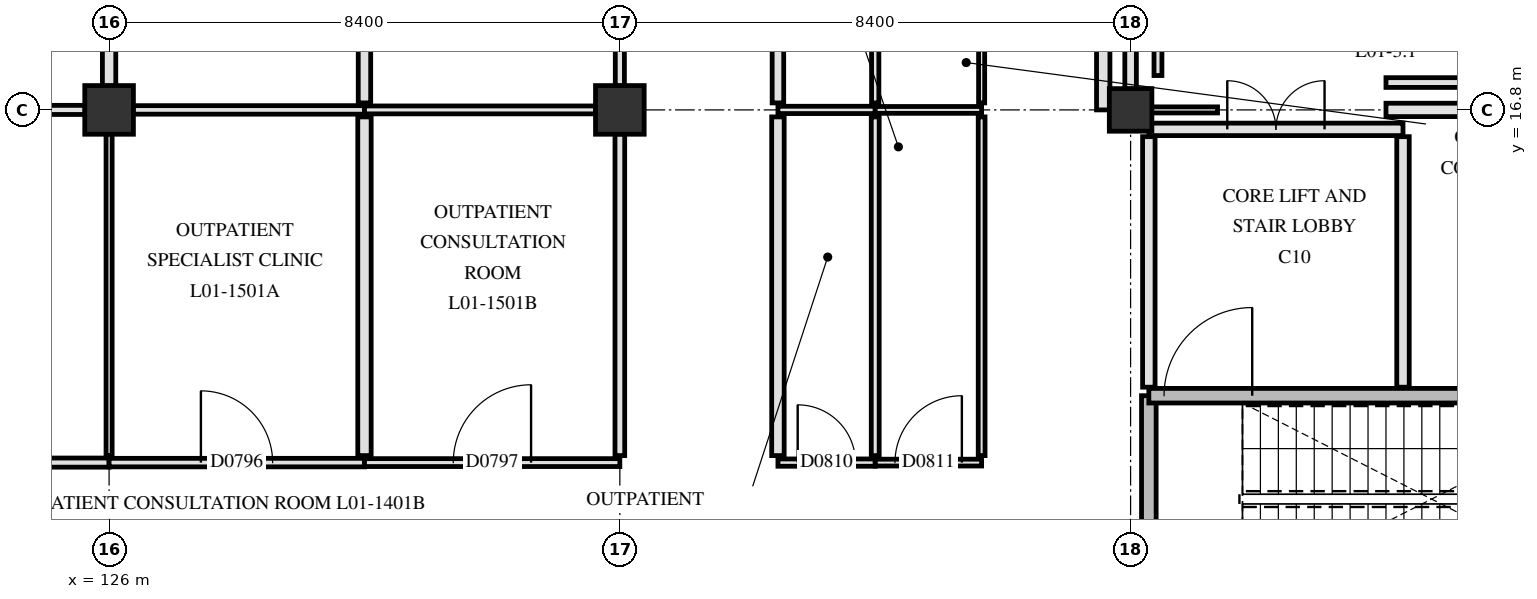
"""IFC4 building model, lengths in metres.
Left out: names, types, materials, properties, quantities, classifications, styles, units other than length and angle.
Written with IfcOpenShell. Run it as: python <this file> out.ifc"""

import sys

from ifc_helpers import new_model, si_unit, direction, frame, frame_2d, origin, origin_2d, place, context, subcontext, project, spatial, rectangle, extrude, element, fill, save


model = new_model("IFC4")
c1 = context("Model", 3, precision=1e-05, world=origin(), true_north=direction((0.0, 1.0)))
c2 = subcontext(c1, "Body", "Model", "MODEL_VIEW")
j1 = project(units=[si_unit("LENGTHUNIT", "METRE"), si_unit("PLANEANGLEUNIT", "RADIAN")], contexts=[c1])
p1 = place(None, origin())
s1 = spatial("IfcSite", under=j1, at=p1, CompositionType="ELEMENT")
p2 = place(p1, origin())
s2 = spatial("IfcBuilding", under=s1, at=p2, CompositionType="ELEMENT")
p3 = place(p2, frame((0.0, 0.0, 4.8)))
s3 = spatial("IfcBuildingStorey", under=s2, at=p3, CompositionType="ELEMENT", Elevation=4.8)
for number, where, z_axis, x_axis in (
    (1, (126.0, 16.8, 0.0), (0.0, 0.0, 1.0), (1.0, 0.0, 0.0)),
    (2, (134.4, 16.8, 0.0), (0.0, 0.0, 1.0), (1.0, 0.0, 0.0)),
):
    element("IfcColumn", number, at=place(p3, frame(where, z_axis=z_axis, x_axis=x_axis)), inside=s3, PredefinedType="COLUMN", context=c2, shape_type="SweptSolid", body=[
        extrude(rectangle(XDim=0.8, YDim=0.8, at=origin_2d()), origin(), (0.0, 0.0, 1.0), 4.5),
    ])
p4 = place(p3, frame((142.8, 16.8, 0.0), z_axis=(0.0, 0.0, 1.0), x_axis=(1.0, 0.0, 0.0)))
e3 = element("IfcColumn", 3, at=p4, inside=s3, PredefinedType="COLUMN", context=c2, shape_type="SweptSolid", body=[
    extrude(rectangle(XDim=0.7, YDim=0.7, at=origin_2d()), origin(), (0.0, 0.0, 1.0), 4.5),
])
p5 = place(p3, frame((143.1, 8.78, 0.0), z_axis=(0.0, 0.0, 1.0), x_axis=(0.0, 1.0, 0.0)))
e4 = element("IfcWall", 4, at=p5, inside=s3, PredefinedType="SHEAR", context=c2, shape_type="SweptSolid", body=[
    extrude(rectangle(XDim=3.32, YDim=0.24, at=frame_2d((1.66, 0.0))), origin(), (0.0, 0.0, 1.0), 4.15),
])
p6 = place(p3, frame((143.1, 12.1, 0.0), z_axis=(0.0, 0.0, 1.0), x_axis=(1.0, 0.0, 0.0)))
e5 = element("IfcWall", 5, at=p6, inside=s3, PredefinedType="SHEAR", context=c2, shape_type="SweptSolid", body=[
    extrude(rectangle(XDim=7.82, YDim=0.24, at=frame_2d((3.91, 0.0))), origin(), (0.0, 0.0, 1.0), 4.15),
])
p7 = place(p6, frame((0.25, 0.0, 0.0)))
e6 = element("IfcOpeningElement", 6, at=p7, cuts=e5, PredefinedType="OPENING", context=c2, shape_type="SweptSolid", body=[
    extrude(rectangle(XDim=1.45, YDim=2.2, at=frame_2d((0.725, 1.1))), frame((0.0, 0.13, 0.0), z_axis=(0.0, -1.0, 0.0), x_axis=(1.0, 0.0, 0.0)), (0.0, 0.0, 1.0), 0.26),
])
p8 = place(p3, frame((147.28, 12.24, 0.0), z_axis=(0.0, 0.0, 1.0), x_axis=(0.0, 1.0, 0.0)))
e7 = element("IfcWall", 7, at=p8, inside=s3, PredefinedType="PARTITIONING", context=c2, shape_type="SweptSolid", body=[
    extrude(rectangle(XDim=4.12, YDim=0.205, at=frame_2d((2.06, 0.0))), origin(), (0.0, 0.0, 1.0), 4.14),
])
p9 = place(p3, frame((143.1, 12.24, 0.0), z_axis=(0.0, 0.0, 1.0), x_axis=(0.0, 1.0, 0.0)))
e8 = element("IfcWall", 8, at=p9, inside=s3, PredefinedType="PARTITIONING", context=c2, shape_type="SweptSolid", body=[
    extrude(rectangle(XDim=4.12, YDim=0.205, at=frame_2d((2.06, 0.0))), origin(), (0.0, 0.0, 1.0), 3.59),
])
p10 = place(p3, frame((143.1, 16.48, 0.0), z_axis=(0.0, 0.0, 1.0), x_axis=(1.0, 0.0, 0.0)))
e9 = element("IfcWall", 9, at=p10, inside=s3, PredefinedType="PARTITIONING", context=c2, shape_type="SweptSolid", body=[
    extrude(rectangle(XDim=4.18, YDim=0.205, at=frame_2d((2.09, 0.0))), origin(), (0.0, 0.0, 1.0), 3.54),
])
p11 = place(p10, frame((1.29, 0.0, 0.0)))
e10 = element("IfcOpeningElement", 10, at=p11, cuts=e9, PredefinedType="OPENING", context=c2, shape_type="SweptSolid", body=[
    extrude(rectangle(XDim=1.6, YDim=2.25, at=frame_2d((0.8, 1.125))), frame((0.0, 0.113, 0.0), z_axis=(0.0, -1.0, 0.0), x_axis=(1.0, 0.0, 0.0)), (0.0, 0.0, 1.0), 0.225),
])
p12 = place(p3, frame((121.8, 11.0, 0.0), z_axis=(0.0, 0.0, 1.0), x_axis=(1.0, 0.0, 0.0)))
e11 = element("IfcWall", 11, at=p12, inside=s3, PredefinedType="PARTITIONING", context=c2, shape_type="SweptSolid", body=[
    extrude(rectangle(XDim=4.2, YDim=0.15, at=frame_2d((2.1, 0.0))), origin(), (0.0, 0.0, 1.0), 3.59),
])
p13 = place(p12, frame((1.5, 0.0, 0.0)))
e12 = element("IfcOpeningElement", 12, at=p13, cuts=e11, PredefinedType="OPENING", context=c2, shape_type="SweptSolid", body=[
    extrude(rectangle(XDim=1.2, YDim=2.15, at=frame_2d((0.6, 1.075))), frame((0.0, 0.085, 0.0), z_axis=(0.0, -1.0, 0.0), x_axis=(1.0, 0.0, 0.0)), (0.0, 0.0, 1.0), 0.17),
])
p14 = place(p3, frame((126.0, 11.0, 0.0), z_axis=(0.0, 0.0, 1.0), x_axis=(1.0, 0.0, 0.0)))
e13 = element("IfcWall", 13, at=p14, inside=s3, PredefinedType="PARTITIONING", context=c2, shape_type="SweptSolid", body=[
    extrude(rectangle(XDim=4.2, YDim=0.14, at=frame_2d((2.1, 0.0))), origin(), (0.0, 0.0, 1.0), 3.59),
])
p15 = place(p14, frame((1.51, 0.0, 0.0)))
e14 = element("IfcOpeningElement", 14, at=p15, cuts=e13, PredefinedType="OPENING", context=c2, shape_type="SweptSolid", body=[
    extrude(rectangle(XDim=1.18, YDim=2.18, at=frame_2d((0.59, 1.09))), frame((0.0, 0.08, 0.0), z_axis=(0.0, -1.0, 0.0), x_axis=(1.0, 0.0, 0.0)), (0.0, 0.0, 1.0), 0.16),
])
p16 = place(p3, frame((130.2, 11.0, 0.0), z_axis=(0.0, 0.0, 1.0), x_axis=(1.0, 0.0, 0.0)))
e15 = element("IfcWall", 15, at=p16, inside=s3, PredefinedType="PARTITIONING", context=c2, shape_type="SweptSolid", body=[
    extrude(rectangle(XDim=4.2, YDim=0.13, at=frame_2d((2.1, 0.0))), origin(), (0.0, 0.0, 1.0), 3.59),
])
p17 = place(p16, frame((1.46, 0.0, 0.0)))
e16 = element("IfcOpeningElement", 16, at=p17, cuts=e15, PredefinedType="OPENING", context=c2, shape_type="SweptSolid", body=[
    extrude(rectangle(XDim=1.28, YDim=2.18, at=frame_2d((0.64, 1.09))), frame((0.0, 0.075, 0.0), z_axis=(0.0, -1.0, 0.0), x_axis=(1.0, 0.0, 0.0)), (0.0, 0.0, 1.0), 0.15),
])
p18 = place(p3, frame((137.0, 11.0, 0.0), z_axis=(0.0, 0.0, 1.0), x_axis=(1.0, 0.0, 0.0)))
e17 = element("IfcWall", 17, at=p18, inside=s3, PredefinedType="PARTITIONING", context=c2, shape_type="SweptSolid", body=[
    extrude(rectangle(XDim=1.6, YDim=0.12, at=frame_2d((0.8, 0.0))), origin(), (0.0, 0.0, 1.0), 4.14),
])
p19 = place(p18, frame((0.325, 0.0, 0.0)))
e18 = element("IfcOpeningElement", 18, at=p19, cuts=e17, PredefinedType="OPENING", context=c2, shape_type="SweptSolid", body=[
    extrude(rectangle(XDim=0.95, YDim=2.1, at=frame_2d((0.475, 1.05))), frame((0.0, 0.07, 0.0), z_axis=(0.0, -1.0, 0.0), x_axis=(1.0, 0.0, 0.0)), (0.0, 0.0, 1.0), 0.14),
])
p20 = place(p3, frame((138.6, 11.0, 0.0), z_axis=(0.0, 0.0, 1.0), x_axis=(1.0, 0.0, 0.0)))
e19 = element("IfcWall", 19, at=p20, inside=s3, PredefinedType="PARTITIONING", context=c2, shape_type="SweptSolid", body=[
    extrude(rectangle(XDim=1.75, YDim=0.112, at=frame_2d((0.875, 0.0))), origin(), (0.0, 0.0, 1.0), 4.14),
])
p21 = place(p20, frame((0.325, 0.0, 0.0)))
e20 = element("IfcOpeningElement", 20, at=p21, cuts=e19, PredefinedType="OPENING", context=c2, shape_type="SweptSolid", body=[
    extrude(rectangle(XDim=1.1, YDim=2.15, at=frame_2d((0.55, 1.075))), frame((0.0, 0.066, 0.0), z_axis=(0.0, -1.0, 0.0), x_axis=(1.0, 0.0, 0.0)), (0.0, 0.0, 1.0), 0.132),
])
p22 = place(p3, frame((121.8, 16.8, 0.0), z_axis=(0.0, 0.0, 1.0), x_axis=(1.0, 0.0, 0.0)))
e21 = element("IfcWall", 21, at=p22, inside=s3, PredefinedType="PARTITIONING", context=c2, shape_type="SweptSolid", body=[
    extrude(rectangle(XDim=3.805, YDim=0.15, at=frame_2d((1.902, 0.0))), origin(), (0.0, 0.0, 1.0), 3.54),
])
p23 = place(p3, frame((126.395, 16.8, 0.0), z_axis=(0.0, 0.0, 1.0), x_axis=(1.0, 0.0, 0.0)))
e22 = element("IfcWall", 22, at=p23, inside=s3, PredefinedType="PARTITIONING", context=c2, shape_type="SweptSolid", body=[
    extrude(rectangle(XDim=3.805, YDim=0.14, at=frame_2d((1.902, 0.0))), origin(), (0.0, 0.0, 1.0), 3.54),
])
p24 = place(p3, frame((130.2, 16.8, 0.0), z_axis=(0.0, 0.0, 1.0), x_axis=(1.0, 0.0, 0.0)))
e23 = element("IfcWall", 23, at=p24, inside=s3, PredefinedType="PARTITIONING", context=c2, shape_type="SweptSolid", body=[
    extrude(rectangle(XDim=3.805, YDim=0.13, at=frame_2d((1.902, 0.0))), origin(), (0.0, 0.0, 1.0), 3.54),
])
p25 = place(p3, frame((137.0, 16.8, 0.0), z_axis=(0.0, 0.0, 1.0), x_axis=(1.0, 0.0, 0.0)))
e24 = element("IfcWall", 24, at=p25, inside=s3, PredefinedType="PARTITIONING", context=c2, shape_type="SweptSolid", body=[
    extrude(rectangle(XDim=1.6, YDim=0.12, at=frame_2d((0.8, 0.0))), origin(), (0.0, 0.0, 1.0), 3.54),
])
p26 = place(p3, frame((138.6, 16.8, 0.0), z_axis=(0.0, 0.0, 1.0), x_axis=(1.0, 0.0, 0.0)))
e25 = element("IfcWall", 25, at=p26, inside=s3, PredefinedType="PARTITIONING", context=c2, shape_type="SweptSolid", body=[
    extrude(rectangle(XDim=1.75, YDim=0.112, at=frame_2d((0.875, 0.0))), origin(), (0.0, 0.0, 1.0), 3.54),
])
p27 = place(p3, frame((143.145, 16.8, 0.0), z_axis=(0.0, 0.0, 1.0), x_axis=(1.0, 0.0, 0.0)))
e26 = element("IfcWall", 26, at=p27, inside=s3, PredefinedType="PARTITIONING", context=c2, shape_type="SweptSolid", body=[
    extrude(rectangle(XDim=1.085, YDim=0.1, at=frame_2d((0.542, 0.0))), origin(), (0.0, 0.0, 1.0), 3.54),
])
p28 = place(p3, frame((147.0, 16.8, 0.0), z_axis=(0.0, 0.0, 1.0), x_axis=(1.0, 0.0, 0.0)))
e27 = element("IfcWall", 27, at=p28, inside=s3, PredefinedType="PARTITIONING", context=c2, shape_type="SweptSolid", body=[
    extrude(rectangle(XDim=3.855, YDim=0.22, at=frame_2d((1.927, 0.0))), origin(), (0.0, 0.0, 1.0), 3.54),
])
p29 = place(p3, frame((147.0, 17.25, 0.0), z_axis=(0.0, 0.0, 1.0), x_axis=(1.0, 0.0, 0.0)))
e28 = element("IfcWall", 28, at=p29, inside=s3, PredefinedType="PARTITIONING", context=c2, shape_type="SweptSolid", body=[
    extrude(rectangle(XDim=3.75, YDim=0.16, at=frame_2d((1.875, 0.0))), origin(), (0.0, 0.0, 1.0), 4.14),
])
p30 = place(p3, frame((126.0, 11.115, 0.0), z_axis=(0.0, 0.0, 1.0), x_axis=(0.0, 1.0, 0.0)))
e29 = element("IfcWall", 29, at=p30, inside=s3, PredefinedType="PARTITIONING", context=c2, shape_type="SweptSolid", body=[
    extrude(rectangle(XDim=5.29, YDim=0.1, at=frame_2d((2.645, 0.0))), origin(), (0.0, 0.0, 1.0), 3.59),
])
p31 = place(p3, frame((126.0, 17.195, 0.0), z_axis=(0.0, 0.0, 1.0), x_axis=(0.0, 1.0, 0.0)))
e30 = element("IfcWall", 30, at=p31, inside=s3, PredefinedType="PARTITIONING", context=c2, shape_type="SweptSolid", body=[
    extrude(rectangle(XDim=5.29, YDim=0.22, at=frame_2d((2.645, 0.0))), origin(), (0.0, 0.0, 1.0), 3.59),
])
p32 = place(p3, frame((130.2, 11.115, 0.0), z_axis=(0.0, 0.0, 1.0), x_axis=(0.0, 1.0, 0.0)))
e31 = element("IfcWall", 31, at=p32, inside=s3, PredefinedType="PARTITIONING", context=c2, shape_type="SweptSolid", body=[
    extrude(rectangle(XDim=5.57, YDim=0.22, at=frame_2d((2.785, 0.0))), origin(), (0.0, 0.0, 1.0), 3.54),
])
p33 = place(p3, frame((130.2, 16.915, 0.0), z_axis=(0.0, 0.0, 1.0), x_axis=(0.0, 1.0, 0.0)))
e32 = element("IfcWall", 32, at=p33, inside=s3, PredefinedType="PARTITIONING", context=c2, shape_type="SweptSolid", body=[
    extrude(rectangle(XDim=5.57, YDim=0.205, at=frame_2d((2.785, 0.0))), origin(), (0.0, 0.0, 1.0), 3.54),
])
p34 = place(p3, frame((134.4, 11.115, 0.0), z_axis=(0.0, 0.0, 1.0), x_axis=(0.0, 1.0, 0.0)))
e33 = element("IfcWall", 33, at=p34, inside=s3, PredefinedType="PARTITIONING", context=c2, shape_type="SweptSolid", body=[
    extrude(rectangle(XDim=5.29, YDim=0.16, at=frame_2d((2.645, 0.0))), origin(), (0.0, 0.0, 1.0), 3.59),
])
p35 = place(p3, frame((134.4, 17.195, 0.0), z_axis=(0.0, 0.0, 1.0), x_axis=(0.0, 1.0, 0.0)))
e34 = element("IfcWall", 34, at=p35, inside=s3, PredefinedType="PARTITIONING", context=c2, shape_type="SweptSolid", body=[
    extrude(rectangle(XDim=5.29, YDim=0.15, at=frame_2d((2.645, 0.0))), origin(), (0.0, 0.0, 1.0), 3.59),
])
p36 = place(p3, frame((137.0, 11.115, 0.0), z_axis=(0.0, 0.0, 1.0), x_axis=(0.0, 1.0, 0.0)))
e35 = element("IfcWall", 35, at=p36, inside=s3, PredefinedType="PARTITIONING", context=c2, shape_type="SweptSolid", body=[
    extrude(rectangle(XDim=5.57, YDim=0.205, at=frame_2d((2.785, 0.0))), origin(), (0.0, 0.0, 1.0), 3.54),
])
p37 = place(p3, frame((137.0, 16.915, 0.0), z_axis=(0.0, 0.0, 1.0), x_axis=(0.0, 1.0, 0.0)))
e36 = element("IfcWall", 36, at=p37, inside=s3, PredefinedType="PARTITIONING", context=c2, shape_type="SweptSolid", body=[
    extrude(rectangle(XDim=5.57, YDim=0.19, at=frame_2d((2.785, 0.0))), origin(), (0.0, 0.0, 1.0), 3.54),
])
p38 = place(p3, frame((138.6, 11.115, 0.0), z_axis=(0.0, 0.0, 1.0), x_axis=(0.0, 1.0, 0.0)))
e37 = element("IfcWall", 37, at=p38, inside=s3, PredefinedType="PARTITIONING", context=c2, shape_type="SweptSolid", body=[
    extrude(rectangle(XDim=5.57, YDim=0.13, at=frame_2d((2.785, 0.0))), origin(), (0.0, 0.0, 1.0), 3.54),
])
p39 = place(p3, frame((138.6, 16.915, 0.0), z_axis=(0.0, 0.0, 1.0), x_axis=(0.0, 1.0, 0.0)))
e38 = element("IfcWall", 38, at=p39, inside=s3, PredefinedType="PARTITIONING", context=c2, shape_type="SweptSolid", body=[
    extrude(rectangle(XDim=5.57, YDim=0.12, at=frame_2d((2.785, 0.0))), origin(), (0.0, 0.0, 1.0), 3.54),
])
p40 = place(p3, frame((140.35, 11.115, 0.0), z_axis=(0.0, 0.0, 1.0), x_axis=(0.0, 1.0, 0.0)))
e39 = element("IfcWall", 39, at=p40, inside=s3, PredefinedType="PARTITIONING", context=c2, shape_type="SweptSolid", body=[
    extrude(rectangle(XDim=5.57, YDim=0.112, at=frame_2d((2.785, 0.0))), origin(), (0.0, 0.0, 1.0), 3.54),
])
p41 = place(p3, frame((140.35, 16.915, 0.0), z_axis=(0.0, 0.0, 1.0), x_axis=(0.0, 1.0, 0.0)))
e40 = element("IfcWall", 40, at=p41, inside=s3, PredefinedType="PARTITIONING", context=c2, shape_type="SweptSolid", body=[
    extrude(rectangle(XDim=2.22, YDim=0.1, at=frame_2d((1.11, 0.0))), origin(), (0.0, 0.0, 1.0), 3.54),
])
p42 = place(p3, frame((142.35, 16.8, 0.0), z_axis=(0.0, 0.0, 1.0), x_axis=(0.0, 1.0, 0.0)))
e41 = element("IfcWall", 41, at=p42, inside=s3, PredefinedType="PARTITIONING", context=c2, shape_type="SweptSolid", body=[
    extrude(rectangle(XDim=2.335, YDim=0.22, at=frame_2d((1.167, 0.0))), origin(), (0.0, 0.0, 1.0), 3.54),
])
p43 = place(p3, frame((142.8, 17.145, 0.0), z_axis=(0.0, 0.0, 1.0), x_axis=(0.0, 1.0, 0.0)))
e42 = element("IfcWall", 42, at=p43, inside=s3, PredefinedType="PARTITIONING", context=c2, shape_type="SweptSolid", body=[
    extrude(rectangle(XDim=5.34, YDim=0.19, at=frame_2d((2.67, 0.0))), origin(), (0.0, 0.0, 1.0), 3.59),
])
p44 = place(p3, frame((143.25, 17.365, 0.0), z_axis=(0.0, 0.0, 1.0), x_axis=(0.0, 1.0, 0.0)))
e43 = element("IfcWall", 43, at=p44, inside=s3, PredefinedType="PARTITIONING", context=c2, shape_type="SweptSolid", body=[
    extrude(rectangle(XDim=1.77, YDim=0.13, at=frame_2d((0.885, 0.0))), origin(), (0.0, 0.0, 1.0), 4.14),
])
p45 = place(p7, origin())
e44 = element("IfcDoor", 44, at=p45, inside=s3, OperationType="SINGLE_SWING_RIGHT", PredefinedType="DOOR", context=c2, shape_type="SweptSolid", body=[
    extrude(rectangle(XDim=1.45, YDim=2.2, at=frame_2d((0.725, 1.1))), frame((0.0, 0.025, 0.0), z_axis=(0.0, -1.0, 0.0), x_axis=(1.0, 0.0, 0.0)), (0.0, 0.0, 1.0), 0.05),
])
fill(e6, e44)
p46 = place(p11, origin())
e45 = element("IfcDoor", 45, at=p46, inside=s3, OperationType="DOUBLE_SWING_LEFT", PredefinedType="DOOR", context=c2, shape_type="SweptSolid", body=[
    extrude(rectangle(XDim=1.6, YDim=2.25, at=frame_2d((0.8, 1.125))), frame((0.0, 0.025, 0.0), z_axis=(0.0, -1.0, 0.0), x_axis=(1.0, 0.0, 0.0)), (0.0, 0.0, 1.0), 0.05),
])
fill(e10, e45)
p47 = place(p15, origin())
e46 = element("IfcDoor", 46, at=p47, inside=s3, OperationType="SINGLE_SWING_LEFT", PredefinedType="DOOR", context=c2, shape_type="SweptSolid", body=[
    extrude(rectangle(XDim=1.18, YDim=2.18, at=frame_2d((0.59, 1.09))), frame((0.0, 0.025, 0.0), z_axis=(0.0, -1.0, 0.0), x_axis=(1.0, 0.0, 0.0)), (0.0, 0.0, 1.0), 0.05),
])
fill(e14, e46)
p48 = place(p17, origin())
e47 = element("IfcDoor", 47, at=p48, inside=s3, OperationType="SINGLE_SWING_RIGHT", PredefinedType="DOOR", context=c2, shape_type="SweptSolid", body=[
    extrude(rectangle(XDim=1.28, YDim=2.18, at=frame_2d((0.64, 1.09))), frame((0.0, 0.025, 0.0), z_axis=(0.0, -1.0, 0.0), x_axis=(1.0, 0.0, 0.0)), (0.0, 0.0, 1.0), 0.05),
])
fill(e16, e47)
p49 = place(p19, origin())
e48 = element("IfcDoor", 48, at=p49, inside=s3, OperationType="SINGLE_SWING_LEFT", PredefinedType="DOOR", context=c2, shape_type="SweptSolid", body=[
    extrude(rectangle(XDim=0.95, YDim=2.1, at=frame_2d((0.475, 1.05))), frame((0.0, 0.025, 0.0), z_axis=(0.0, -1.0, 0.0), x_axis=(1.0, 0.0, 0.0)), (0.0, 0.0, 1.0), 0.05),
])
fill(e18, e48)
p50 = place(p21, origin())
e49 = element("IfcDoor", 49, at=p50, inside=s3, OperationType="SINGLE_SWING_RIGHT", PredefinedType="DOOR", context=c2, shape_type="SweptSolid", body=[
    extrude(rectangle(XDim=1.1, YDim=2.15, at=frame_2d((0.55, 1.075))), frame((0.0, 0.025, 0.0), z_axis=(0.0, -1.0, 0.0), x_axis=(1.0, 0.0, 0.0)), (0.0, 0.0, 1.0), 0.05),
])
fill(e20, e49)
save(model, sys.argv[1])
